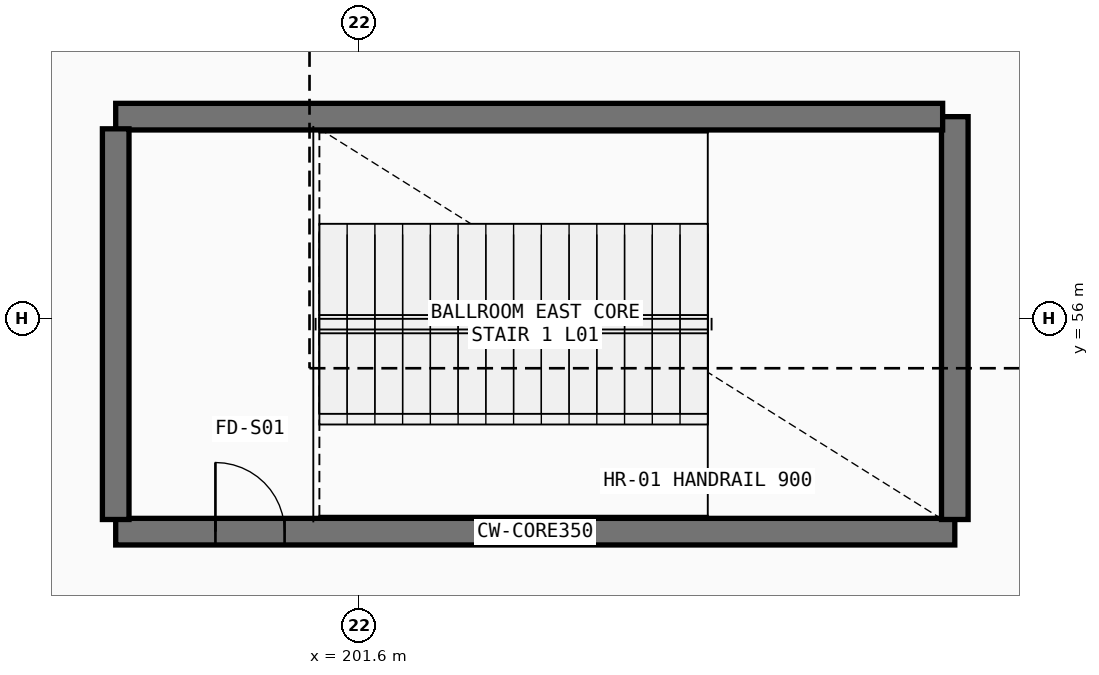
"""IFC4 building model, lengths in metres.
Left out: names, types, materials, properties, quantities, classifications, styles, units other than length and angle.
Written with IfcOpenShell. Run it as: python <this file> out.ifc"""

import sys

from ifc_helpers import new_model, si_unit, direction, frame, frame_2d, origin, place, context, subcontext, project, spatial, rectangle, extrude, element, fill, save


model = new_model("IFC4")
c1 = context("Model", 3, precision=1e-05, world=origin(), true_north=direction((0.0, 1.0)))
c2 = subcontext(c1, "Body", "Model", "MODEL_VIEW")
j1 = project(units=[si_unit("LENGTHUNIT", "METRE"), si_unit("PLANEANGLEUNIT", "RADIAN")], contexts=[c1])
p1 = place(None, origin())
s1 = spatial("IfcSite", under=j1, at=p1, CompositionType="ELEMENT")
p2 = place(p1, origin())
s2 = spatial("IfcBuilding", under=s1, at=p2, CompositionType="ELEMENT")
p3 = place(p2, frame((0.0, 0.0, 6.0)))
s3 = spatial("IfcBuildingStorey", under=s2, at=p3, CompositionType="ELEMENT", Elevation=6.0)
p4 = place(p3, frame((198.4, 53.2, 0.0), z_axis=(0.0, 0.0, 1.0), x_axis=(1.0, 0.0, 0.0)))
e1 = element("IfcWall", 1, at=p4, inside=s3, PredefinedType="SHEAR", context=c2, shape_type="SweptSolid", body=[
    extrude(rectangle(XDim=11.04, YDim=0.35, at=frame_2d((5.52, 0.0))), origin(), (0.0, 0.0, 1.0), 5.17),
])
p5 = place(p4, frame((1.312, 0.0, 0.0)))
e2 = element("IfcOpeningElement", 2, at=p5, cuts=e1, PredefinedType="OPENING", context=c2, shape_type="SweptSolid", body=[
    extrude(rectangle(XDim=0.91, YDim=2.08, at=frame_2d((0.455, 1.04))), frame((0.0, 0.185, 0.0), z_axis=(0.0, -1.0, 0.0), x_axis=(1.0, 0.0, 0.0)), (0.0, 0.0, 1.0), 0.37),
])
p6 = place(p3, frame((209.44, 53.36, 0.0), z_axis=(0.0, 0.0, 1.0), x_axis=(0.0, 1.0, 0.0)))
e3 = element("IfcWall", 3, at=p6, inside=s3, PredefinedType="SHEAR", context=c2, shape_type="SweptSolid", body=[
    extrude(rectangle(XDim=5.3, YDim=0.35, at=frame_2d((2.65, 0.0))), origin(), (0.0, 0.0, 1.0), 5.17),
])
p7 = place(p3, frame((209.28, 58.66, 0.0), z_axis=(0.0, 0.0, 1.0), x_axis=(-1.0, 0.0, 0.0)))
e4 = element("IfcWall", 4, at=p7, inside=s3, PredefinedType="SHEAR", context=c2, shape_type="SweptSolid", body=[
    extrude(rectangle(XDim=10.88, YDim=0.35, at=frame_2d((5.44, 0.0))), origin(), (0.0, 0.0, 1.0), 5.17),
])
p8 = place(p3, frame((198.4, 58.5, 0.0), z_axis=(0.0, 0.0, 1.0), x_axis=(0.0, -1.0, 0.0)))
e5 = element("IfcWall", 5, at=p8, inside=s3, PredefinedType="SHEAR", context=c2, shape_type="SweptSolid", body=[
    extrude(rectangle(XDim=5.14, YDim=0.35, at=frame_2d((2.57, 0.0))), origin(), (0.0, 0.0, 1.0), 5.17),
])
p9 = place(p5, origin())
e6 = element("IfcDoor", 6, at=p9, inside=s3, OperationType="SINGLE_SWING_RIGHT", PredefinedType="DOOR", context=c2, shape_type="SweptSolid", body=[
    extrude(rectangle(XDim=0.91, YDim=2.08, at=frame_2d((0.455, 1.04))), frame((0.0, 0.025, 0.0), z_axis=(0.0, -1.0, 0.0), x_axis=(1.0, 0.0, 0.0)), (0.0, 0.0, 1.0), 0.05),
])
fill(e2, e6)
save(model, sys.argv[1])
